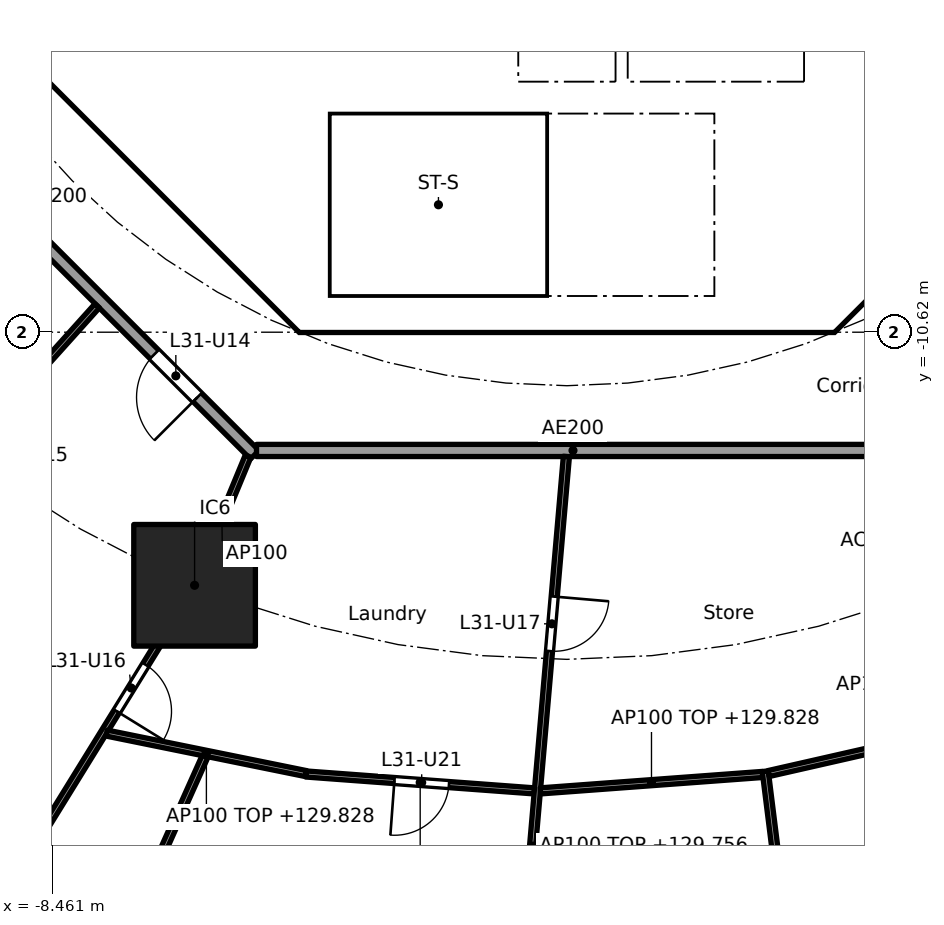
"""IFC4 building model, lengths in metres.
Left out: names, types, materials, properties, quantities, classifications, styles, units other than length and angle.
Written with IfcOpenShell. Run it as: python <this file> out.ifc"""

import sys

from ifc_helpers import new_model, si_unit, direction, frame, frame_2d, origin, origin_2d, place, context, subcontext, project, spatial, polyline, rectangle, outline, extrude, element, fill, save


model = new_model("IFC4")
c1 = context("Model", 3, precision=1e-05, world=origin(), true_north=direction((0.0, 1.0)))
c2 = subcontext(c1, "Body", "Model", "MODEL_VIEW")
j1 = project(units=[si_unit("LENGTHUNIT", "METRE"), si_unit("PLANEANGLEUNIT", "RADIAN")], contexts=[c1])
p1 = place(None, origin())
s1 = spatial("IfcSite", under=j1, at=p1, CompositionType="ELEMENT")
p2 = place(p1, origin())
s2 = spatial("IfcBuilding", under=s1, at=p2, CompositionType="ELEMENT")
p3 = place(p2, frame((0.0, 0.0, 127.0)))
s3 = spatial("IfcBuildingStorey", under=s2, at=p3, CompositionType="ELEMENT", Elevation=127.0)
p4 = place(p3, frame((-6.123, -14.782, 0.0), z_axis=(0.0, 0.0, 1.0), x_axis=(1.0, 0.0, 0.0)))
e1 = element("IfcColumn", 1, at=p4, inside=s3, PredefinedType="COLUMN", context=c2, shape_type="SweptSolid", body=[
    extrude(rectangle(XDim=2.0, YDim=2.0, at=origin_2d()), origin(), (0.0, 0.0, 1.0), 3.7),
])
p5 = place(p3, frame((-9.988, -4.613, 0.0), z_axis=(0.0, 0.0, 1.0), x_axis=(0.707106781187, -0.707106781187, 0.0)))
e2 = element("IfcWall", 2, at=p5, inside=s3, PredefinedType="SHEAR", context=c2, shape_type="SweptSolid", body=[
    extrude(rectangle(XDim=7.602, YDim=0.6, at=frame_2d((3.801, 0.0))), origin(), (0.0, 0.0, 1.0), 3.44),
])
p6 = place(p5, frame((6.151, 0.0, 0.0)))
e3 = element("IfcOpeningElement", 3, at=p6, cuts=e2, PredefinedType="OPENING", context=c2, shape_type="SweptSolid", body=[
    extrude(rectangle(XDim=1.1, YDim=2.1, at=frame_2d((0.55, 1.05))), frame((0.0, 0.31, 0.0), z_axis=(0.0, -1.0, 0.0), x_axis=(1.0, 0.0, 0.0)), (0.0, 0.0, 1.0), 0.62),
])
p7 = place(p3, frame((4.613, -9.988, 0.0), z_axis=(0.0, 0.0, 1.0), x_axis=(0.707106781187, 0.707106781187, 0.0)))
e4 = element("IfcWall", 4, at=p7, inside=s3, PredefinedType="SHEAR", context=c2, shape_type="SweptSolid", body=[
    extrude(rectangle(XDim=7.602, YDim=0.6, at=frame_2d((3.801, 0.0))), origin(), (0.0, 0.0, 1.0), 3.44),
])
p8 = place(p7, frame((3.201, 0.0, 0.0)))
e5 = element("IfcOpeningElement", 5, at=p8, cuts=e4, PredefinedType="OPENING", context=c2, shape_type="SweptSolid", body=[
    extrude(rectangle(XDim=1.2, YDim=2.1, at=frame_2d((0.6, 1.05))), frame((0.0, 0.31, 0.0), z_axis=(0.0, -1.0, 0.0), x_axis=(1.0, 0.0, 0.0)), (0.0, 0.0, 1.0), 0.62),
])
p9 = place(p3, frame((4.0, -10.025, 0.0), z_axis=(0.0, 0.0, 1.0), x_axis=(0.0, 1.0, 0.0)))
e6 = element("IfcWall", 6, at=p9, inside=s3, PredefinedType="SOLIDWALL", context=c2, shape_type="SweptSolid", body=[
    extrude(rectangle(XDim=3.0, YDim=0.2, at=frame_2d((1.5, 0.0))), origin(), (0.0, 0.0, 1.0), 3.44),
])
p10 = place(p9, frame((0.975, 0.0, 0.0)))
e7 = element("IfcOpeningElement", 7, at=p10, cuts=e6, PredefinedType="OPENING", context=c2, shape_type="SweptSolid", body=[
    extrude(rectangle(XDim=1.1, YDim=2.1, at=frame_2d((0.55, 1.05))), frame((0.0, 0.11, 0.0), z_axis=(0.0, -1.0, 0.0), x_axis=(1.0, 0.0, 0.0)), (0.0, 0.0, 1.0), 0.22),
])
p11 = place(p3, frame((-6.2, -7.827, 0.0), z_axis=(0.0, 0.0, 1.0), x_axis=(0.0, 1.0, 0.0)))
e8 = element("IfcWall", 8, at=p11, inside=s3, PredefinedType="PARTITIONING", context=c2, shape_type="SweptSolid", body=[
    extrude(rectangle(XDim=3.527, YDim=0.15, at=frame_2d((1.763, 0.0))), origin(), (0.0, 0.0, 1.0), 3.44),
])
p12 = place(p11, frame((2.365, 0.0, 0.0)))
e9 = element("IfcOpeningElement", 9, at=p12, cuts=e8, PredefinedType="OPENING", context=c2, shape_type="SweptSolid", body=[
    extrude(rectangle(XDim=0.9, YDim=2.1, at=frame_2d((0.45, 1.05))), frame((0.0, 0.085, 0.0), z_axis=(0.0, -1.0, 0.0), x_axis=(1.0, 0.0, 0.0)), (0.0, 0.0, 1.0), 0.17),
])
p13 = place(p11, frame((0.489, 0.0, 0.0)))
e10 = element("IfcOpeningElement", 10, at=p13, cuts=e8, PredefinedType="OPENING", context=c2, shape_type="SweptSolid", body=[
    extrude(rectangle(XDim=0.9, YDim=2.1, at=frame_2d((0.45, 1.05))), frame((0.0, 0.085, 0.0), z_axis=(0.0, -1.0, 0.0), x_axis=(1.0, 0.0, 0.0)), (0.0, 0.0, 1.0), 0.17),
])
p14 = place(p3, frame((4.0, -6.5, 0.0), z_axis=(0.0, 0.0, 1.0), x_axis=(0.0, 1.0, 0.0)))
e11 = element("IfcWall", 11, at=p14, inside=s3, PredefinedType="SOLIDWALL", context=c2, shape_type="SweptSolid", body=[
    extrude(rectangle(XDim=2.2, YDim=0.2, at=frame_2d((1.1, 0.0))), origin(), (0.0, 0.0, 1.0), 3.44),
])
p15 = place(p14, frame((0.55, 0.0, 0.0)))
e12 = element("IfcOpeningElement", 12, at=p15, cuts=e11, PredefinedType="OPENING", context=c2, shape_type="SweptSolid", body=[
    extrude(rectangle(XDim=1.1, YDim=2.1, at=frame_2d((0.55, 1.05))), frame((0.0, 0.11, 0.0), z_axis=(0.0, -1.0, 0.0), x_axis=(1.0, 0.0, 0.0)), (0.0, 0.0, 1.0), 0.22),
])
p16 = place(p3, frame((-4.0, -6.5, 0.0), z_axis=(0.0, 0.0, 1.0), x_axis=(0.0, 1.0, 0.0)))
e13 = element("IfcWall", 13, at=p16, inside=s3, PredefinedType="SOLIDWALL", context=c2, shape_type="SweptSolid", body=[
    extrude(rectangle(XDim=2.2, YDim=0.2, at=frame_2d((1.1, 0.0))), origin(), (0.0, 0.0, 1.0), 3.44),
])
p17 = place(p16, frame((0.65, 0.0, 0.0)))
e14 = element("IfcOpeningElement", 14, at=p17, cuts=e13, PredefinedType="OPENING", context=c2, shape_type="SweptSolid", body=[
    extrude(rectangle(XDim=0.9, YDim=2.1, at=frame_2d((0.45, 1.05))), frame((0.0, 0.11, 0.0), z_axis=(0.0, -1.0, 0.0), x_axis=(1.0, 0.0, 0.0)), (0.0, 0.0, 1.0), 0.22),
])
p18 = place(p3, origin())
e15 = element("IfcWall", 15, at=p18, inside=s3, PredefinedType="SHEAR", context=c2, shape_type="SweptSolid", body=[
    extrude(outline(polyline([(-4.152, -10.025), (4.152, -10.025), (4.401, -9.776), (4.825, -10.2), (4.401, -10.625), (-4.401, -10.625), (-4.825, -10.2), (-4.401, -9.776), (-4.152, -10.025)])), origin(), (0.0, 0.0, 1.0), 3.44),
])
for number, where, z_axis, x_axis in (
    (16, (-0.9, -6.5, 0.0), (0.0, 0.0, 1.0), (0.0, 1.0, 0.0)),
    (17, (0.9, -6.5, 0.0), (0.0, 0.0, 1.0), (0.0, 1.0, 0.0)),
):
    element("IfcWall", number, at=place(p3, frame(where, z_axis=z_axis, x_axis=x_axis)), inside=s3, PredefinedType="SOLIDWALL", context=c2, shape_type="SweptSolid", body=[
        extrude(rectangle(XDim=2.2, YDim=0.2, at=frame_2d((1.1, 0.0))), origin(), (0.0, 0.0, 1.0), 3.44),
    ])
p19 = place(p3, origin())
e18 = element("IfcWall", 18, at=p19, inside=s3, PredefinedType="SOLIDWALL", context=c2, shape_type="SweptSolid", body=[
    extrude(outline(polyline([(-3.9, -10.025), (-4.1, -10.025), (-4.1, -7.025), (-3.9, -7.025), (-3.9, -10.025)])), origin(), (0.0, 0.0, 1.0), 3.44),
])
p20 = place(p3, origin())
e19 = element("IfcWall", 19, at=p20, inside=s3, PredefinedType="SOLIDWALL", context=c2, shape_type="SweptSolid", body=[
    extrude(outline(polyline([(4.1, -7.025), (-4.1, -7.025), (-4.1, -6.5), (4.1, -6.5), (4.1, -7.025)])), origin(), (0.0, 0.0, 1.0), 3.44),
])
p21 = place(p3, frame((-12.635, -5.134, 0.0), z_axis=(0.0, 0.0, 1.0), x_axis=(0.707106781187, -0.707106781187, 0.0)))
e20 = element("IfcWall", 20, at=p21, inside=s3, PredefinedType="PARTITIONING", context=c2, shape_type="SweptSolid", body=[
    extrude(rectangle(XDim=10.609, YDim=0.2, at=frame_2d((5.305, 0.0))), origin(), (0.0, 0.0, 1.0), 3.44),
])
p22 = place(p21, frame((8.274, 0.0, 0.0)))
e21 = element("IfcOpeningElement", 21, at=p22, cuts=e20, PredefinedType="OPENING", context=c2, shape_type="SweptSolid", body=[
    extrude(rectangle(XDim=1.0, YDim=2.1, at=frame_2d((0.5, 1.05))), frame((0.0, 0.11, 0.0), z_axis=(0.0, -1.0, 0.0), x_axis=(1.0, 0.0, 0.0)), (0.0, 0.0, 1.0), 0.22),
])
p23 = place(p3, frame((-5.104, -12.565, 0.0), z_axis=(0.0, 0.0, 1.0), x_axis=(1.0, 0.0, 0.0)))
e22 = element("IfcWall", 22, at=p23, inside=s3, PredefinedType="PARTITIONING", context=c2, shape_type="SweptSolid", body=[
    extrude(rectangle(XDim=10.409, YDim=0.2, at=frame_2d((5.205, 0.0))), origin(), (0.0, 0.0, 1.0), 3.44),
])
p24 = place(p3, frame((-7.725, -10.186, 0.0), z_axis=(0.0, 0.0, 1.0), x_axis=(-0.668498346565, -0.743713628112, 0.0)))
e23 = element("IfcWall", 23, at=p24, inside=s3, PredefinedType="PARTITIONING", context=c2, shape_type="SweptSolid", body=[
    extrude(rectangle(XDim=11.919, YDim=0.1, at=frame_2d((5.959, 0.0))), origin(), (0.0, 0.0, 1.0), 2.756),
])
p25 = place(p24, frame((2.106, 0.0, 0.0)))
e24 = element("IfcOpeningElement", 24, at=p25, cuts=e23, PredefinedType="OPENING", context=c2, shape_type="SweptSolid", body=[
    extrude(rectangle(XDim=0.9, YDim=2.1, at=frame_2d((0.45, 1.05))), frame((0.0, 0.06, 0.0), z_axis=(0.0, -1.0, 0.0), x_axis=(1.0, 0.0, 0.0)), (0.0, 0.0, 1.0), 0.12),
])
p26 = place(p24, frame((8.041, 0.0, 0.0)))
e25 = element("IfcOpeningElement", 25, at=p26, cuts=e23, PredefinedType="OPENING", context=c2, shape_type="SweptSolid", body=[
    extrude(rectangle(XDim=0.9, YDim=2.1, at=frame_2d((0.45, 1.05))), frame((0.0, 0.06, 0.0), z_axis=(0.0, -1.0, 0.0), x_axis=(1.0, 0.0, 0.0)), (0.0, 0.0, 1.0), 0.12),
])
p27 = place(p3, frame((-5.243, -12.657, 0.0), z_axis=(0.0, 0.0, 1.0), x_axis=(-0.382811769845, -0.923826362943, 0.0)))
e26 = element("IfcWall", 26, at=p27, inside=s3, PredefinedType="PARTITIONING", context=c2, shape_type="SweptSolid", body=[
    extrude(rectangle(XDim=2.25, YDim=0.1, at=frame_2d((1.125, 0.0))), origin(), (0.0, 0.0, 1.0), 3.44),
])
p28 = place(p3, frame((-6.149, -14.825, 0.0), z_axis=(0.0, 0.0, 1.0), x_axis=(-0.525396393596, -0.850857584791, 0.0)))
e27 = element("IfcWall", 27, at=p28, inside=s3, PredefinedType="PARTITIONING", context=c2, shape_type="SweptSolid", body=[
    extrude(rectangle(XDim=9.643, YDim=0.1, at=frame_2d((4.822, 0.0))), origin(), (0.0, 0.0, 1.0), 3.44),
])
p29 = place(p28, frame((1.485, 0.0, 0.0)))
e28 = element("IfcOpeningElement", 28, at=p29, cuts=e27, PredefinedType="OPENING", context=c2, shape_type="SweptSolid", body=[
    extrude(rectangle(XDim=0.9, YDim=2.1, at=frame_2d((0.45, 1.05))), frame((0.0, 0.06, 0.0), z_axis=(0.0, -1.0, 0.0), x_axis=(1.0, 0.0, 0.0)), (0.0, 0.0, 1.0), 0.12),
])
p30 = place(p28, frame((5.744, 0.0, 0.0)))
e29 = element("IfcOpeningElement", 29, at=p30, cuts=e27, PredefinedType="OPENING", context=c2, shape_type="SweptSolid", body=[
    extrude(rectangle(XDim=0.9, YDim=2.1, at=frame_2d((0.45, 1.05))), frame((0.0, 0.06, 0.0), z_axis=(0.0, -1.0, 0.0), x_axis=(1.0, 0.0, 0.0)), (0.0, 0.0, 1.0), 0.12),
])
p31 = place(p3, frame((-7.568, -17.212, 0.0), z_axis=(0.0, 0.0, 1.0), x_axis=(0.979967079473, -0.199159541946, 0.0)))
e30 = element("IfcWall", 30, at=p31, inside=s3, PredefinedType="PARTITIONING", context=c2, shape_type="SweptSolid", body=[
    extrude(rectangle(XDim=3.347, YDim=0.1, at=frame_2d((1.673, 0.0))), origin(), (0.0, 0.0, 1.0), 2.828),
])
p32 = place(p3, frame((-5.949, -17.591, 0.0), z_axis=(0.0, 0.0, 1.0), x_axis=(-0.40838467696, -0.912809923053, 0.0)))
e31 = element("IfcWall", 31, at=p32, inside=s3, PredefinedType="PARTITIONING", context=c2, shape_type="SweptSolid", body=[
    extrude(rectangle(XDim=14.665, YDim=0.1, at=frame_2d((7.333, 0.0))), origin(), (0.0, 0.0, 1.0), 2.905),
])
p33 = place(p32, frame((10.334, 0.0, 0.0)))
e32 = element("IfcOpeningElement", 32, at=p33, cuts=e31, PredefinedType="OPENING", context=c2, shape_type="SweptSolid", body=[
    extrude(rectangle(XDim=0.9, YDim=2.1, at=frame_2d((0.45, 1.05))), frame((0.0, 0.06, 0.0), z_axis=(0.0, -1.0, 0.0), x_axis=(1.0, 0.0, 0.0)), (0.0, 0.0, 1.0), 0.12),
])
p34 = place(p3, frame((-4.29, -17.885, 0.0), z_axis=(0.0, 0.0, 1.0), x_axis=(0.997272353708, -0.073809569363, 0.0)))
e33 = element("IfcWall", 33, at=p34, inside=s3, PredefinedType="PARTITIONING", context=c2, shape_type="SweptSolid", body=[
    extrude(rectangle(XDim=3.764, YDim=0.1, at=frame_2d((1.882, 0.0))), origin(), (0.0, 0.0, 1.0), 2.828),
])
p35 = place(p34, frame((1.457, 0.0, 0.0)))
e34 = element("IfcOpeningElement", 34, at=p35, cuts=e33, PredefinedType="OPENING", context=c2, shape_type="SweptSolid", body=[
    extrude(rectangle(XDim=0.9, YDim=2.1, at=frame_2d((0.45, 1.05))), frame((0.0, 0.06, 0.0), z_axis=(0.0, -1.0, 0.0), x_axis=(1.0, 0.0, 0.0)), (0.0, 0.0, 1.0), 0.12),
])
p36 = place(p3, frame((-0.009, -12.664, 0.0), z_axis=(0.0, 0.0, 1.0), x_axis=(-0.086441225464, -0.996256952066, 0.0)))
e35 = element("IfcWall", 35, at=p36, inside=s3, PredefinedType="PARTITIONING", context=c2, shape_type="SweptSolid", body=[
    extrude(rectangle(XDim=12.862, YDim=0.1, at=frame_2d((6.431, 0.0))), origin(), (0.0, 0.0, 1.0), 2.756),
])
p37 = place(p36, frame((2.312, 0.0, 0.0)))
e36 = element("IfcOpeningElement", 36, at=p37, cuts=e35, PredefinedType="OPENING", context=c2, shape_type="SweptSolid", body=[
    extrude(rectangle(XDim=0.9, YDim=2.1, at=frame_2d((0.45, 1.05))), frame((0.0, 0.06, 0.0), z_axis=(0.0, -1.0, 0.0), x_axis=(1.0, 0.0, 0.0)), (0.0, 0.0, 1.0), 0.12),
])
p38 = place(p36, frame((8.718, 0.0, 0.0)))
e37 = element("IfcOpeningElement", 37, at=p38, cuts=e35, PredefinedType="OPENING", context=c2, shape_type="SweptSolid", body=[
    extrude(rectangle(XDim=0.9, YDim=2.1, at=frame_2d((0.45, 1.05))), frame((0.0, 0.06, 0.0), z_axis=(0.0, -1.0, 0.0), x_axis=(1.0, 0.0, 0.0)), (0.0, 0.0, 1.0), 0.12),
])
p39 = place(p3, frame((-0.436, -18.163, 0.0), z_axis=(0.0, 0.0, 1.0), x_axis=(0.997271025958, 0.073827506966, 0.0)))
e38 = element("IfcWall", 38, at=p39, inside=s3, PredefinedType="PARTITIONING", context=c2, shape_type="SweptSolid", body=[
    extrude(rectangle(XDim=3.664, YDim=0.1, at=frame_2d((1.832, 0.0))), origin(), (0.0, 0.0, 1.0), 2.828),
])
p40 = place(p3, frame((3.262, -17.839, 0.0), z_axis=(0.0, 0.0, 1.0), x_axis=(0.124074750982, -0.992272873845, 0.0)))
e39 = element("IfcWall", 39, at=p40, inside=s3, PredefinedType="PARTITIONING", context=c2, shape_type="SweptSolid", body=[
    extrude(rectangle(XDim=13.516, YDim=0.1, at=frame_2d((6.758, 0.0))), origin(), (0.0, 0.0, 1.0), 2.828),
])
p41 = place(p40, frame((3.078, 0.0, 0.0)))
e40 = element("IfcOpeningElement", 40, at=p41, cuts=e39, PredefinedType="OPENING", context=c2, shape_type="SweptSolid", body=[
    extrude(rectangle(XDim=0.9, YDim=2.1, at=frame_2d((0.45, 1.05))), frame((0.0, 0.06, 0.0), z_axis=(0.0, -1.0, 0.0), x_axis=(1.0, 0.0, 0.0)), (0.0, 0.0, 1.0), 0.12),
])
p42 = place(p40, frame((9.811, 0.0, 0.0)))
e41 = element("IfcOpeningElement", 41, at=p42, cuts=e39, PredefinedType="OPENING", context=c2, shape_type="SweptSolid", body=[
    extrude(rectangle(XDim=0.9, YDim=2.1, at=frame_2d((0.45, 1.05))), frame((0.0, 0.06, 0.0), z_axis=(0.0, -1.0, 0.0), x_axis=(1.0, 0.0, 0.0)), (0.0, 0.0, 1.0), 0.12),
])
p43 = place(p3, frame((3.317, -17.878, 0.0), z_axis=(0.0, 0.0, 1.0), x_axis=(0.975095905288, 0.221783623135, 0.0)))
e42 = element("IfcWall", 42, at=p43, inside=s3, PredefinedType="PARTITIONING", context=c2, shape_type="SweptSolid", body=[
    extrude(rectangle(XDim=3.636, YDim=0.1, at=frame_2d((1.818, 0.0))), origin(), (0.0, 0.0, 1.0), 2.828),
])
p44 = place(p10, origin())
e43 = element("IfcDoor", 43, at=p44, inside=s3, OperationType="SINGLE_SWING_RIGHT", PredefinedType="DOOR", context=c2, shape_type="SweptSolid", body=[
    extrude(rectangle(XDim=1.1, YDim=2.1, at=frame_2d((0.55, 1.05))), frame((0.0, 0.025, 0.0), z_axis=(0.0, -1.0, 0.0), x_axis=(1.0, 0.0, 0.0)), (0.0, 0.0, 1.0), 0.05),
])
fill(e7, e43)
p45 = place(p13, origin())
e44 = element("IfcDoor", 44, at=p45, inside=s3, OperationType="SINGLE_SWING_RIGHT", PredefinedType="DOOR", context=c2, shape_type="SweptSolid", body=[
    extrude(rectangle(XDim=0.9, YDim=2.1, at=frame_2d((0.45, 1.05))), frame((0.0, 0.025, 0.0), z_axis=(0.0, -1.0, 0.0), x_axis=(1.0, 0.0, 0.0)), (0.0, 0.0, 1.0), 0.05),
])
fill(e10, e44)
p46 = place(p6, origin())
e45 = element("IfcDoor", 45, at=p46, inside=s3, OperationType="SINGLE_SWING_RIGHT", PredefinedType="DOOR", context=c2, shape_type="SweptSolid", body=[
    extrude(rectangle(XDim=1.1, YDim=2.1, at=frame_2d((0.55, 1.05))), frame((0.0, 0.025, 0.0), z_axis=(0.0, -1.0, 0.0), x_axis=(1.0, 0.0, 0.0)), (0.0, 0.0, 1.0), 0.05),
])
fill(e3, e45)
p47 = place(p22, frame((1.0, 0.0, 0.0), x_axis=(-1.0, 0.0, 0.0)))
e46 = element("IfcDoor", 46, at=p47, inside=s3, OperationType="SINGLE_SWING_LEFT", PredefinedType="DOOR", context=c2, shape_type="SweptSolid", body=[
    extrude(rectangle(XDim=1.0, YDim=2.1, at=frame_2d((0.5, 1.05))), frame((0.0, 0.025, 0.0), z_axis=(0.0, -1.0, 0.0), x_axis=(1.0, 0.0, 0.0)), (0.0, 0.0, 1.0), 0.05),
])
fill(e21, e46)
p48 = place(p29, origin())
e47 = element("IfcDoor", 47, at=p48, inside=s3, OperationType="SINGLE_SWING_RIGHT", PredefinedType="DOOR", context=c2, shape_type="SweptSolid", body=[
    extrude(rectangle(XDim=0.9, YDim=2.1, at=frame_2d((0.45, 1.05))), frame((0.0, 0.025, 0.0), z_axis=(0.0, -1.0, 0.0), x_axis=(1.0, 0.0, 0.0)), (0.0, 0.0, 1.0), 0.05),
])
fill(e28, e47)
p49 = place(p37, origin())
e48 = element("IfcDoor", 48, at=p49, inside=s3, OperationType="SINGLE_SWING_LEFT", PredefinedType="DOOR", context=c2, shape_type="SweptSolid", body=[
    extrude(rectangle(XDim=0.9, YDim=2.1, at=frame_2d((0.45, 1.05))), frame((0.0, 0.025, 0.0), z_axis=(0.0, -1.0, 0.0), x_axis=(1.0, 0.0, 0.0)), (0.0, 0.0, 1.0), 0.05),
])
fill(e36, e48)
p50 = place(p35, frame((0.9, 0.0, 0.0), x_axis=(-1.0, 0.0, 0.0)))
e49 = element("IfcDoor", 49, at=p50, inside=s3, OperationType="SINGLE_SWING_RIGHT", PredefinedType="DOOR", context=c2, shape_type="SweptSolid", body=[
    extrude(rectangle(XDim=0.9, YDim=2.1, at=frame_2d((0.45, 1.05))), frame((0.0, 0.025, 0.0), z_axis=(0.0, -1.0, 0.0), x_axis=(1.0, 0.0, 0.0)), (0.0, 0.0, 1.0), 0.05),
])
fill(e34, e49)
save(model, sys.argv[1])
